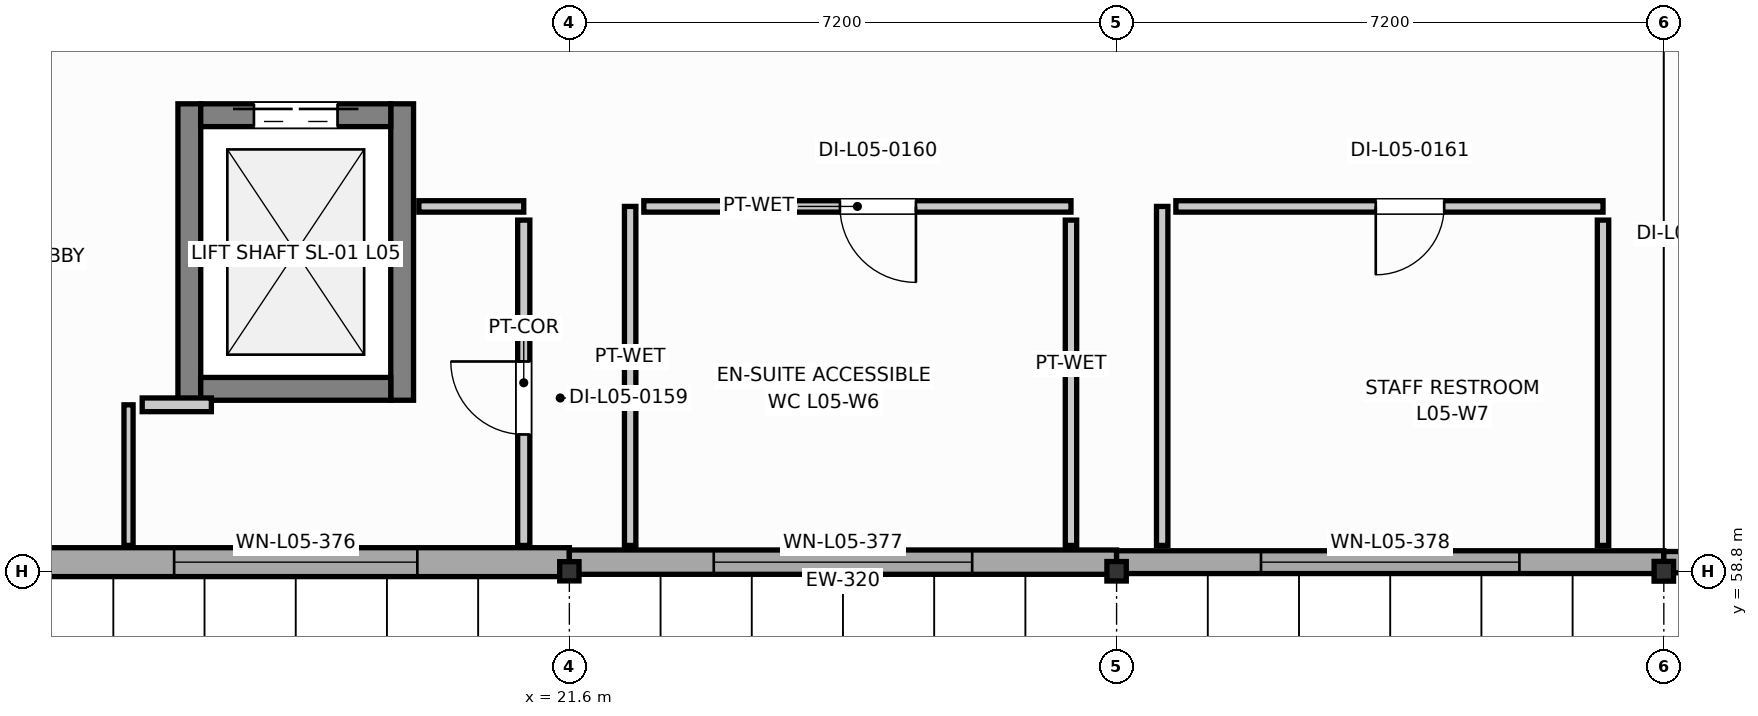
"""IFC4 building model, lengths in metres.
Left out: names, types, materials, properties, quantities, classifications, styles, units other than length and angle.
Written with IfcOpenShell. Run it as: python <this file> out.ifc"""

import sys

from ifc_helpers import new_model, si_unit, direction, frame, frame_2d, origin, origin_2d, place, context, subcontext, project, spatial, rectangle, i_section, extrude, element, fill, save


model = new_model("IFC4")
c1 = context("Model", 3, precision=1e-05, world=origin(), true_north=direction((0.0, 1.0)))
c2 = subcontext(c1, "Body", "Model", "MODEL_VIEW")
j1 = project(units=[si_unit("LENGTHUNIT", "METRE"), si_unit("PLANEANGLEUNIT", "RADIAN")], contexts=[c1])
p1 = place(None, origin())
s1 = spatial("IfcSite", under=j1, at=p1, CompositionType="ELEMENT")
p2 = place(p1, origin())
s2 = spatial("IfcBuilding", under=s1, at=p2, CompositionType="ELEMENT")
p3 = place(p2, frame((0.0, 0.0, 21.6)))
s3 = spatial("IfcBuildingStorey", under=s2, at=p3, CompositionType="ELEMENT", Elevation=21.6)
p4 = place(p3, frame((21.6, 58.8, 0.0), z_axis=(0.0, 0.0, 1.0), x_axis=(1.0, 0.0, 0.0)))
e1 = element("IfcColumn", 1, at=p4, inside=s3, PredefinedType="COLUMN", context=c2, shape_type="SweptSolid", body=[
    extrude(i_section(OverallWidth=0.254, OverallDepth=0.253, WebThickness=0.009, FlangeThickness=0.014, FilletRadius=0.013, at=origin_2d()), origin(), (0.0, 0.0, 1.0), 4.2),
])
p5 = place(p3, frame((28.8, 58.8, 0.0), z_axis=(0.0, 0.0, 1.0), x_axis=(1.0, 0.0, 0.0)))
e2 = element("IfcColumn", 2, at=p5, inside=s3, PredefinedType="COLUMN", context=c2, shape_type="SweptSolid", body=[
    extrude(i_section(OverallWidth=0.255, OverallDepth=0.256, WebThickness=0.01, FlangeThickness=0.016, FilletRadius=0.013, at=origin_2d()), origin(), (0.0, 0.0, 1.0), 4.2),
])
p6 = place(p3, frame((36.0, 58.8, 0.0), z_axis=(0.0, 0.0, 1.0), x_axis=(1.0, 0.0, 0.0)))
e3 = element("IfcColumn", 3, at=p6, inside=s3, PredefinedType="COLUMN", context=c2, shape_type="SweptSolid", body=[
    extrude(i_section(OverallWidth=0.256, OverallDepth=0.26, WebThickness=0.011, FlangeThickness=0.017, FilletRadius=0.013, at=origin_2d()), origin(), (0.0, 0.0, 1.0), 4.2),
])
for number, where, z_axis, x_axis in (
    (4, (16.6, 61.05, 0.0), (0.0, 0.0, 1.0), (0.0, 1.0, 0.0)),
    (5, (19.4, 61.05, 0.0), (0.0, 0.0, 1.0), (0.0, 1.0, 0.0)),
):
    element("IfcWall", number, at=place(p3, frame(where, z_axis=z_axis, x_axis=x_axis)), inside=s3, PredefinedType="SHEAR", context=c2, shape_type="SweptSolid", body=[
        extrude(rectangle(XDim=3.9, YDim=0.3, at=frame_2d((1.95, 0.0))), origin(), (0.0, 0.0, 1.0), 4.0),
    ])
p7 = place(p3, frame((16.75, 64.8, 0.0), z_axis=(0.0, 0.0, 1.0), x_axis=(1.0, 0.0, 0.0)))
e6 = element("IfcWall", 6, at=p7, inside=s3, PredefinedType="SHEAR", context=c2, shape_type="SweptSolid", body=[
    extrude(rectangle(XDim=2.5, YDim=0.3, at=frame_2d((1.25, 0.0))), origin(), (0.0, 0.0, 1.0), 4.0),
])
p8 = place(p7, frame((0.7, 0.0, 0.0)))
e7 = element("IfcOpeningElement", 7, at=p8, cuts=e6, PredefinedType="OPENING", context=c2, shape_type="SweptSolid", body=[
    extrude(rectangle(XDim=1.1, YDim=2.15, at=frame_2d((0.55, 1.075))), frame((0.0, 0.16, 0.0), z_axis=(0.0, -1.0, 0.0), x_axis=(1.0, 0.0, 0.0)), (0.0, 0.0, 1.0), 0.32),
])
p9 = place(p3, frame((16.75, 61.2, 0.0), z_axis=(0.0, 0.0, 1.0), x_axis=(1.0, 0.0, 0.0)))
e8 = element("IfcWall", 8, at=p9, inside=s3, PredefinedType="SHEAR", context=c2, shape_type="SweptSolid", body=[
    extrude(rectangle(XDim=2.5, YDim=0.3, at=frame_2d((1.25, 0.0))), origin(), (0.0, 0.0, 1.0), 4.0),
])
p10 = place(p3, frame((14.4, 58.92, 0.0), z_axis=(0.0, 0.0, 1.0), x_axis=(1.0, 0.0, 0.0)))
e9 = element("IfcWall", 9, at=p10, inside=s3, PredefinedType="SOLIDWALL", context=c2, shape_type="SweptSolid", body=[
    extrude(rectangle(XDim=7.2, YDim=0.38, at=frame_2d((3.6, 0.0))), origin(), (0.0, 0.0, 1.0), 3.482),
])
p11 = place(p10, frame((2.0, 0.0, 0.95)))
e10 = element("IfcOpeningElement", 10, at=p11, cuts=e9, PredefinedType="OPENING", context=c2, shape_type="SweptSolid", body=[
    extrude(rectangle(XDim=3.2, YDim=1.75, at=frame_2d((1.6, 0.875))), frame((0.0, 0.2, 0.0), z_axis=(0.0, -1.0, 0.0), x_axis=(1.0, 0.0, 0.0)), (0.0, 0.0, 1.0), 0.4),
])
p12 = place(p3, frame((21.6, 58.92, 0.0), z_axis=(0.0, 0.0, 1.0), x_axis=(1.0, 0.0, 0.0)))
e11 = element("IfcWall", 11, at=p12, inside=s3, PredefinedType="SOLIDWALL", context=c2, shape_type="SweptSolid", body=[
    extrude(rectangle(XDim=7.2, YDim=0.32, at=frame_2d((3.6, 0.0))), origin(), (0.0, 0.0, 1.0), 3.529),
])
p13 = place(p12, frame((1.9, 0.0, 0.95)))
e12 = element("IfcOpeningElement", 12, at=p13, cuts=e11, PredefinedType="OPENING", context=c2, shape_type="SweptSolid", body=[
    extrude(rectangle(XDim=3.4, YDim=1.15, at=frame_2d((1.7, 0.575))), frame((0.0, 0.17, 0.0), z_axis=(0.0, -1.0, 0.0), x_axis=(1.0, 0.0, 0.0)), (0.0, 0.0, 1.0), 0.34),
])
p14 = place(p3, frame((28.8, 58.92, 0.0), z_axis=(0.0, 0.0, 1.0), x_axis=(1.0, 0.0, 0.0)))
e13 = element("IfcWall", 13, at=p14, inside=s3, PredefinedType="SOLIDWALL", context=c2, shape_type="SweptSolid", body=[
    extrude(rectangle(XDim=7.2, YDim=0.3, at=frame_2d((3.6, 0.0))), origin(), (0.0, 0.0, 1.0), 3.529),
])
p15 = place(p14, frame((1.9, 0.0, 0.95)))
e14 = element("IfcOpeningElement", 14, at=p15, cuts=e13, PredefinedType="OPENING", context=c2, shape_type="SweptSolid", body=[
    extrude(rectangle(XDim=3.4, YDim=1.35, at=frame_2d((1.7, 0.675))), frame((0.0, 0.16, 0.0), z_axis=(0.0, -1.0, 0.0), x_axis=(1.0, 0.0, 0.0)), (0.0, 0.0, 1.0), 0.32),
])
p16 = place(p3, frame((36.0, 58.92, 0.0), z_axis=(0.0, 0.0, 1.0), x_axis=(1.0, 0.0, 0.0)))
e15 = element("IfcWall", 15, at=p16, inside=s3, PredefinedType="SOLIDWALL", context=c2, shape_type="SweptSolid", body=[
    extrude(rectangle(XDim=7.2, YDim=0.28, at=frame_2d((3.6, 0.0))), origin(), (0.0, 0.0, 1.0), 3.529),
])
p17 = place(p16, frame((1.9, 0.0, 0.95)))
e16 = element("IfcOpeningElement", 16, at=p17, cuts=e15, PredefinedType="OPENING", context=c2, shape_type="SweptSolid", body=[
    extrude(rectangle(XDim=3.4, YDim=1.55, at=frame_2d((1.7, 0.775))), frame((0.0, 0.15, 0.0), z_axis=(0.0, -1.0, 0.0), x_axis=(1.0, 0.0, 0.0)), (0.0, 0.0, 1.0), 0.3),
])
p18 = place(p3, frame((19.62, 63.6, 0.0), z_axis=(0.0, 0.0, 1.0), x_axis=(1.0, 0.0, 0.0)))
e17 = element("IfcWall", 17, at=p18, inside=s3, PredefinedType="PLUMBINGWALL", context=c2, shape_type="SweptSolid", body=[
    extrude(rectangle(XDim=1.38, YDim=0.15, at=frame_2d((0.69, 0.0))), origin(), (0.0, 0.0, 1.0), 3.945),
])
p19 = place(p3, frame((21.0, 63.42, 0.0), z_axis=(0.0, 0.0, 1.0), x_axis=(0.0, -1.0, 0.0)))
e18 = element("IfcWall", 18, at=p19, inside=s3, PredefinedType="PARTITIONING", context=c2, shape_type="SweptSolid", body=[
    extrude(rectangle(XDim=4.28, YDim=0.16, at=frame_2d((2.14, 0.0))), origin(), (0.0, 0.0, 1.0), 3.945),
])
p20 = place(p19, frame((1.86, 0.0, 0.0)))
e19 = element("IfcOpeningElement", 19, at=p20, cuts=e18, PredefinedType="OPENING", context=c2, shape_type="SweptSolid", body=[
    extrude(rectangle(XDim=0.96, YDim=2.1, at=frame_2d((0.48, 1.05))), frame((0.0, 0.09, 0.0), z_axis=(0.0, -1.0, 0.0), x_axis=(1.0, 0.0, 0.0)), (0.0, 0.0, 1.0), 0.18),
])
p21 = place(p3, frame((15.8, 59.14, 0.0), z_axis=(0.0, 0.0, 1.0), x_axis=(0.0, 1.0, 0.0)))
e20 = element("IfcWall", 20, at=p21, inside=s3, PredefinedType="PARTITIONING", context=c2, shape_type="SweptSolid", body=[
    extrude(rectangle(XDim=1.85, YDim=0.12, at=frame_2d((0.925, 0.0))), origin(), (0.0, 0.0, 1.0), 3.945),
])
p22 = place(p3, frame((15.98, 60.99, 0.0), z_axis=(0.0, 0.0, 1.0), x_axis=(1.0, 0.0, 0.0)))
e21 = element("IfcWall", 21, at=p22, inside=s3, PredefinedType="PARTITIONING", context=c2, shape_type="SweptSolid", body=[
    extrude(rectangle(XDim=0.91, YDim=0.18, at=frame_2d((0.455, 0.0))), origin(), (0.0, 0.0, 1.0), 3.945),
])
p23 = place(p3, frame((22.4, 59.14, 0.0), z_axis=(0.0, 0.0, 1.0), x_axis=(0.0, 1.0, 0.0)))
e22 = element("IfcWall", 22, at=p23, inside=s3, PredefinedType="PLUMBINGWALL", context=c2, shape_type="SweptSolid", body=[
    extrude(rectangle(XDim=4.46, YDim=0.15, at=frame_2d((2.23, 0.0))), origin(), (0.0, 0.0, 1.0), 3.945),
])
p24 = place(p3, frame((22.58, 63.6, 0.0), z_axis=(0.0, 0.0, 1.0), x_axis=(1.0, 0.0, 0.0)))
e23 = element("IfcWall", 23, at=p24, inside=s3, PredefinedType="PLUMBINGWALL", context=c2, shape_type="SweptSolid", body=[
    extrude(rectangle(XDim=5.62, YDim=0.15, at=frame_2d((2.81, 0.0))), origin(), (0.0, 0.0, 1.0), 3.945),
])
p25 = place(p24, frame((2.58, 0.0, 0.0)))
e24 = element("IfcOpeningElement", 24, at=p25, cuts=e23, PredefinedType="OPENING", context=c2, shape_type="SweptSolid", body=[
    extrude(rectangle(XDim=1.0, YDim=2.1, at=frame_2d((0.5, 1.05))), frame((0.0, 0.085, 0.0), z_axis=(0.0, -1.0, 0.0), x_axis=(1.0, 0.0, 0.0)), (0.0, 0.0, 1.0), 0.17),
])
p26 = place(p3, frame((28.2, 63.42, 0.0), z_axis=(0.0, 0.0, 1.0), x_axis=(0.0, -1.0, 0.0)))
e25 = element("IfcWall", 25, at=p26, inside=s3, PredefinedType="PLUMBINGWALL", context=c2, shape_type="SweptSolid", body=[
    extrude(rectangle(XDim=4.28, YDim=0.15, at=frame_2d((2.14, 0.0))), origin(), (0.0, 0.0, 1.0), 3.945),
])
p27 = place(p3, frame((29.4, 59.14, 0.0), z_axis=(0.0, 0.0, 1.0), x_axis=(0.0, 1.0, 0.0)))
e26 = element("IfcWall", 26, at=p27, inside=s3, PredefinedType="PLUMBINGWALL", context=c2, shape_type="SweptSolid", body=[
    extrude(rectangle(XDim=4.46, YDim=0.15, at=frame_2d((2.23, 0.0))), origin(), (0.0, 0.0, 1.0), 3.945),
])
p28 = place(p3, frame((29.58, 63.6, 0.0), z_axis=(0.0, 0.0, 1.0), x_axis=(1.0, 0.0, 0.0)))
e27 = element("IfcWall", 27, at=p28, inside=s3, PredefinedType="PLUMBINGWALL", context=c2, shape_type="SweptSolid", body=[
    extrude(rectangle(XDim=5.62, YDim=0.15, at=frame_2d((2.81, 0.0))), origin(), (0.0, 0.0, 1.0), 3.945),
])
p29 = place(p28, frame((2.63, 0.0, 0.0)))
e28 = element("IfcOpeningElement", 28, at=p29, cuts=e27, PredefinedType="OPENING", context=c2, shape_type="SweptSolid", body=[
    extrude(rectangle(XDim=0.9, YDim=2.1, at=frame_2d((0.45, 1.05))), frame((0.0, 0.085, 0.0), z_axis=(0.0, -1.0, 0.0), x_axis=(1.0, 0.0, 0.0)), (0.0, 0.0, 1.0), 0.17),
])
p30 = place(p3, frame((35.2, 63.42, 0.0), z_axis=(0.0, 0.0, 1.0), x_axis=(0.0, -1.0, 0.0)))
e29 = element("IfcWall", 29, at=p30, inside=s3, PredefinedType="PLUMBINGWALL", context=c2, shape_type="SweptSolid", body=[
    extrude(rectangle(XDim=4.28, YDim=0.15, at=frame_2d((2.14, 0.0))), origin(), (0.0, 0.0, 1.0), 3.945),
])
p31 = place(p8, origin())
e30 = element("IfcDoor", 30, at=p31, inside=s3, OperationType="DOUBLE_DOOR_SLIDING", PredefinedType="DOOR", context=c2, shape_type="SweptSolid", body=[
    extrude(rectangle(XDim=1.1, YDim=2.15, at=frame_2d((0.55, 1.075))), frame((0.0, 0.025, 0.0), z_axis=(0.0, -1.0, 0.0), x_axis=(1.0, 0.0, 0.0)), (0.0, 0.0, 1.0), 0.05),
])
fill(e7, e30)
p32 = place(p11, origin())
e31 = element("IfcWindow", 31, at=p32, inside=s3, PartitioningType="SINGLE_PANEL", PredefinedType="WINDOW", context=c2, shape_type="SweptSolid", body=[
    extrude(rectangle(XDim=3.2, YDim=1.75, at=frame_2d((1.6, 0.875))), frame((0.0, 0.03, 0.0), z_axis=(0.0, -1.0, 0.0), x_axis=(1.0, 0.0, 0.0)), (0.0, 0.0, 1.0), 0.06),
])
fill(e10, e31)
p33 = place(p13, origin())
e32 = element("IfcWindow", 32, at=p33, inside=s3, PartitioningType="SINGLE_PANEL", PredefinedType="WINDOW", context=c2, shape_type="SweptSolid", body=[
    extrude(rectangle(XDim=3.4, YDim=1.15, at=frame_2d((1.7, 0.575))), frame((0.0, 0.03, 0.0), z_axis=(0.0, -1.0, 0.0), x_axis=(1.0, 0.0, 0.0)), (0.0, 0.0, 1.0), 0.06),
])
fill(e12, e32)
p34 = place(p15, origin())
e33 = element("IfcWindow", 33, at=p34, inside=s3, PartitioningType="SINGLE_PANEL", PredefinedType="WINDOW", context=c2, shape_type="SweptSolid", body=[
    extrude(rectangle(XDim=3.4, YDim=1.35, at=frame_2d((1.7, 0.675))), frame((0.0, 0.03, 0.0), z_axis=(0.0, -1.0, 0.0), x_axis=(1.0, 0.0, 0.0)), (0.0, 0.0, 1.0), 0.06),
])
fill(e14, e33)
p35 = place(p20, frame((0.96, 0.0, 0.0), z_axis=(0.0, 0.0, 1.0), x_axis=(-1.0, 0.0, 0.0)))
e34 = element("IfcDoor", 34, at=p35, inside=s3, OperationType="SINGLE_SWING_RIGHT", PredefinedType="DOOR", context=c2, shape_type="SweptSolid", body=[
    extrude(rectangle(XDim=0.96, YDim=2.1, at=frame_2d((0.48, 1.05))), frame((0.0, 0.025, 0.0), z_axis=(0.0, -1.0, 0.0), x_axis=(1.0, 0.0, 0.0)), (0.0, 0.0, 1.0), 0.05),
])
fill(e19, e34)
p36 = place(p25, frame((1.0, 0.0, 0.0), z_axis=(0.0, 0.0, 1.0), x_axis=(-1.0, 0.0, 0.0)))
e35 = element("IfcDoor", 35, at=p36, inside=s3, OperationType="SINGLE_SWING_LEFT", PredefinedType="DOOR", context=c2, shape_type="SweptSolid", body=[
    extrude(rectangle(XDim=1.0, YDim=2.1, at=frame_2d((0.5, 1.05))), frame((0.0, 0.025, 0.0), z_axis=(0.0, -1.0, 0.0), x_axis=(1.0, 0.0, 0.0)), (0.0, 0.0, 1.0), 0.05),
])
fill(e24, e35)
p37 = place(p29, frame((0.9, 0.0, 0.0), z_axis=(0.0, 0.0, 1.0), x_axis=(-1.0, 0.0, 0.0)))
e36 = element("IfcDoor", 36, at=p37, inside=s3, OperationType="SINGLE_SWING_RIGHT", PredefinedType="DOOR", context=c2, shape_type="SweptSolid", body=[
    extrude(rectangle(XDim=0.9, YDim=2.1, at=frame_2d((0.45, 1.05))), frame((0.0, 0.025, 0.0), z_axis=(0.0, -1.0, 0.0), x_axis=(1.0, 0.0, 0.0)), (0.0, 0.0, 1.0), 0.05),
])
fill(e28, e36)
save(model, sys.argv[1])
